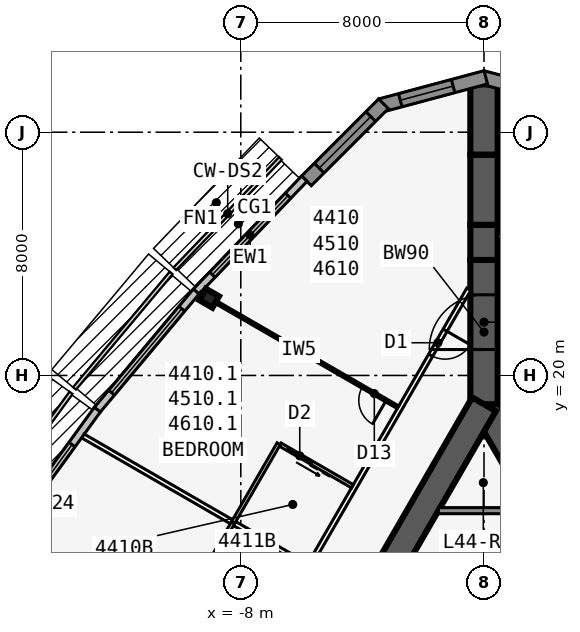
"""IFC4 building model, lengths in metres.
Left out: names, types, materials, properties, quantities, classifications, styles, units other than length and angle.
Written with IfcOpenShell. Run it as: python <this file> out.ifc"""

import sys

from ifc_helpers import new_model, si_unit, direction, frame, frame_2d, origin, origin_2d, place, context, subcontext, project, spatial, polyline, rectangle, i_section, outline, extrude, element, fill, save


model = new_model("IFC4")
c1 = context("Model", 3, precision=1e-05, world=origin(), true_north=direction((0.0, 1.0)))
c2 = subcontext(c1, "Body", "Model", "MODEL_VIEW")
j1 = project(units=[si_unit("LENGTHUNIT", "METRE"), si_unit("PLANEANGLEUNIT", "RADIAN")], contexts=[c1])
p1 = place(None, origin())
s1 = spatial("IfcSite", under=j1, at=p1, CompositionType="ELEMENT")
p2 = place(p1, origin())
s2 = spatial("IfcBuilding", under=s1, at=p2, CompositionType="ELEMENT")
p3 = place(p2, frame((0.0, 0.0, 165.7)))
s3 = spatial("IfcBuildingStorey", under=s2, at=p3, CompositionType="ELEMENT", Elevation=165.7)
p4 = place(p3, frame((16.5, -9.526, 0.0), z_axis=(0.0, 0.0, 1.0), x_axis=(-0.499999749417, 0.866025548458, 0.0)))
e1 = element("IfcWall", 1, at=p4, inside=s3, PredefinedType="SHEAR", context=c2, shape_type="SweptSolid", body=[
    extrude(rectangle(XDim=33.0, YDim=0.9, at=frame_2d((16.5, 0.0))), origin(), (0.0, 0.0, 1.0), 3.4),
])
p5 = place(p4, frame((14.15, 0.0, 0.0)))
e2 = element("IfcOpeningElement", 2, at=p5, cuts=e1, PredefinedType="OPENING", context=c2, shape_type="SweptSolid", body=[
    extrude(rectangle(XDim=1.8, YDim=2.13, at=frame_2d((0.9, 1.065))), frame((0.0, 0.46, 0.0), z_axis=(0.0, -1.0, 0.0), x_axis=(1.0, 0.0, 0.0)), (0.0, 0.0, 1.0), 0.92),
])
p6 = place(p4, frame((12.6, 0.0, 0.0)))
e3 = element("IfcOpeningElement", 3, at=p6, cuts=e1, PredefinedType="OPENING", context=c2, shape_type="SweptSolid", body=[
    extrude(rectangle(XDim=1.0, YDim=2.13, at=frame_2d((0.5, 1.065))), frame((0.0, 0.46, 0.0), z_axis=(0.0, -1.0, 0.0), x_axis=(1.0, 0.0, 0.0)), (0.0, 0.0, 1.0), 0.92),
])
p7 = place(p3, frame((0.0, 19.052, 0.0), z_axis=(0.0, 0.0, 1.0), x_axis=(-0.499999749417, -0.866025548458, 0.0)))
e4 = element("IfcWall", 4, at=p7, inside=s3, PredefinedType="SHEAR", context=c2, shape_type="SweptSolid", body=[
    extrude(rectangle(XDim=33.0, YDim=0.9, at=frame_2d((16.5, 0.0))), origin(), (0.0, 0.0, 1.0), 3.4),
])
p8 = place(p7, frame((14.15, 0.0, 0.0)))
e5 = element("IfcOpeningElement", 5, at=p8, cuts=e4, PredefinedType="OPENING", context=c2, shape_type="SweptSolid", body=[
    extrude(rectangle(XDim=1.8, YDim=2.13, at=frame_2d((0.9, 1.065))), frame((0.0, 0.46, 0.0), z_axis=(0.0, -1.0, 0.0), x_axis=(1.0, 0.0, 0.0)), (0.0, 0.0, 1.0), 0.92),
])
p9 = place(p7, frame((12.6, 0.0, 0.0)))
e6 = element("IfcOpeningElement", 6, at=p9, cuts=e4, PredefinedType="OPENING", context=c2, shape_type="SweptSolid", body=[
    extrude(rectangle(XDim=1.0, YDim=2.13, at=frame_2d((0.5, 1.065))), frame((0.0, 0.46, 0.0), z_axis=(0.0, -1.0, 0.0), x_axis=(1.0, 0.0, 0.0)), (0.0, 0.0, 1.0), 0.92),
])
p10 = place(p3, frame((0.0, 19.052, 0.0), z_axis=(0.0, 0.0, 1.0), x_axis=(0.0, 1.0, 0.0)))
e7 = element("IfcWall", 7, at=p10, inside=s3, PredefinedType="SHEAR", context=c2, shape_type="SweptSolid", body=[
    extrude(rectangle(XDim=4.746, YDim=0.9, at=frame_2d((2.373, 0.0))), origin(), (0.0, 0.0, 1.0), 3.4),
])
p11 = place(p10, frame((1.8, 0.0, 0.0)))
e8 = element("IfcOpeningElement", 8, at=p11, cuts=e7, PredefinedType="OPENING", context=c2, shape_type="SweptSolid", body=[
    extrude(rectangle(XDim=1.8, YDim=2.13, at=frame_2d((0.9, 1.065))), frame((0.0, 0.46, 0.0), z_axis=(0.0, -1.0, 0.0), x_axis=(1.0, 0.0, 0.0)), (0.0, 0.0, 1.0), 0.92),
])
p12 = place(p3, frame((0.0, 23.799, 0.0), z_axis=(0.0, 0.0, 1.0), x_axis=(0.0, 1.0, 0.0)))
e9 = element("IfcWall", 9, at=p12, inside=s3, PredefinedType="SHEAR", context=c2, shape_type="SweptSolid", body=[
    extrude(rectangle(XDim=1.155, YDim=0.9, at=frame_2d((0.577, 0.0))), origin(), (0.0, 0.0, 1.0), 3.4),
])
p13 = place(p3, frame((0.0, 24.953, 0.0), z_axis=(0.0, 0.0, 1.0), x_axis=(0.0, 1.0, 0.0)))
e10 = element("IfcWall", 10, at=p13, inside=s3, PredefinedType="SHEAR", context=c2, shape_type="SweptSolid", body=[
    extrude(rectangle(XDim=2.309, YDim=0.9, at=frame_2d((1.155, 0.0))), origin(), (0.0, 0.0, 1.0), 3.4),
])
p14 = place(p3, frame((0.0, 27.263, 0.0), z_axis=(0.0, 0.0, 1.0), x_axis=(0.0, 1.0, 0.0)))
e11 = element("IfcWall", 11, at=p14, inside=s3, PredefinedType="SHEAR", context=c2, shape_type="SweptSolid", body=[
    extrude(rectangle(XDim=2.31, YDim=0.9, at=frame_2d((1.155, 0.0))), origin(), (0.0, 0.0, 1.0), 3.4),
])
p15 = place(p3, frame((-9.041, 22.541, 0.0), z_axis=(0.0, 0.0, 1.0), x_axis=(-0.5, -0.866025403784, 0.0)))
e12 = element("IfcColumn", 12, at=p15, inside=s3, PredefinedType="COLUMN", context=c2, shape_type="SweptSolid", body=[
    extrude(i_section(OverallWidth=0.432, OverallDepth=0.498, WebThickness=0.056, FlangeThickness=0.089, at=origin_2d()), origin(), (0.0, 0.0, 1.0), 3.4),
])
p16 = place(p3, frame((3.406, 28.877, 0.0), z_axis=(0.0, 0.0, 1.0), x_axis=(-0.965924653531, 0.258823421857, 0.0)))
e13 = element("IfcWall", 13, at=p16, inside=s3, PredefinedType="SOLIDWALL", context=c2, shape_type="SweptSolid", body=[
    extrude(outline(polyline([(3.586, 0.225), (3.527, 0.225), (3.035, 0.093), (3.0, 0.225), (0.0, 0.225), (0.0, -0.225), (3.586, -0.225), (3.586, 0.225)])), origin(), (0.0, 0.0, 1.0), 3.235),
])
p17 = place(p16, frame((0.675, 0.0, 0.45)))
e14 = element("IfcOpeningElement", 14, at=p17, cuts=e13, PredefinedType="OPENING", context=c2, shape_type="SweptSolid", body=[
    extrude(rectangle(XDim=1.8, YDim=2.4, at=frame_2d((0.9, 1.2))), frame((0.0, 0.235, 0.0), z_axis=(0.0, -1.0, 0.0), x_axis=(1.0, 0.0, 0.0)), (0.0, 0.0, 1.0), 0.47),
])
p18 = place(p3, frame((0.058, 29.805, 0.0), z_axis=(0.0, 0.0, 1.0), x_axis=(-0.965924653531, -0.258823421857, 0.0)))
e15 = element("IfcWall", 15, at=p18, inside=s3, PredefinedType="SOLIDWALL", context=c2, shape_type="SweptSolid", body=[
    extrude(outline(polyline([(3.586, 0.225), (0.586, 0.225), (0.551, 0.093), (0.06, 0.225), (0.0, 0.225), (0.0, -0.225), (3.586, -0.225), (3.586, 0.225)])), origin(), (0.0, 0.0, 1.0), 3.235),
])
p19 = place(p18, frame((1.111, 0.0, 0.45)))
e16 = element("IfcOpeningElement", 16, at=p19, cuts=e15, PredefinedType="OPENING", context=c2, shape_type="SweptSolid", body=[
    extrude(rectangle(XDim=1.8, YDim=2.4, at=frame_2d((0.9, 1.2))), frame((0.0, 0.235, 0.0), z_axis=(0.0, -1.0, 0.0), x_axis=(1.0, 0.0, 0.0)), (0.0, 0.0, 1.0), 0.47),
])
p20 = place(p3, frame((-3.305, 28.935, 0.0), z_axis=(0.0, 0.0, 1.0), x_axis=(-0.707106781187, -0.707106781187, 0.0)))
e17 = element("IfcWall", 17, at=p20, inside=s3, PredefinedType="SOLIDWALL", context=c2, shape_type="SweptSolid", body=[
    extrude(rectangle(XDim=3.586, YDim=0.45, at=frame_2d((1.793, 0.0))), origin(), (0.0, 0.0, 1.0), 3.235),
])
p21 = place(p20, frame((0.593, 0.0, 0.45)))
e18 = element("IfcOpeningElement", 18, at=p21, cuts=e17, PredefinedType="OPENING", context=c2, shape_type="SweptSolid", body=[
    extrude(rectangle(XDim=2.4, YDim=2.4, at=frame_2d((1.2, 1.2))), frame((0.0, 0.235, 0.0), z_axis=(0.0, -1.0, 0.0), x_axis=(1.0, 0.0, 0.0)), (0.0, 0.0, 1.0), 0.47),
])
p22 = place(p3, frame((-5.91, 26.472, 0.0), z_axis=(0.0, 0.0, 1.0), x_axis=(-0.691719937936, -0.722165858693, 0.0)))
e19 = element("IfcWall", 19, at=p22, inside=s3, PredefinedType="STANDARD", context=c2, shape_type="SweptSolid", body=[
    extrude(rectangle(XDim=5.148, YDim=0.25, at=frame_2d((2.574, 0.0))), origin(), (0.0, 0.0, 1.0), 3.235),
])
p23 = place(p22, frame((0.774, 0.0, 0.45)))
e20 = element("IfcOpeningElement", 20, at=p23, cuts=e19, PredefinedType="OPENING", context=c2, shape_type="SweptSolid", body=[
    extrude(rectangle(XDim=3.6, YDim=2.4, at=frame_2d((1.8, 1.2))), frame((0.0, 0.135, 0.0), z_axis=(0.0, -1.0, 0.0), x_axis=(1.0, 0.0, 0.0)), (0.0, 0.0, 1.0), 0.27),
])
p24 = place(p3, frame((-9.465, 22.76, 0.0), z_axis=(0.0, 0.0, 1.0), x_axis=(-0.641810386606, -0.766863369607, 0.0)))
e21 = element("IfcWall", 21, at=p24, inside=s3, PredefinedType="STANDARD", context=c2, shape_type="SweptSolid", body=[
    extrude(rectangle(XDim=5.076, YDim=0.25, at=frame_2d((2.538, 0.0))), origin(), (0.0, 0.0, 1.0), 3.235),
])
p25 = place(p24, frame((0.738, 0.0, 0.45)))
e22 = element("IfcOpeningElement", 22, at=p25, cuts=e21, PredefinedType="OPENING", context=c2, shape_type="SweptSolid", body=[
    extrude(rectangle(XDim=3.6, YDim=2.4, at=frame_2d((1.8, 1.2))), frame((0.0, 0.135, 0.0), z_axis=(0.0, -1.0, 0.0), x_axis=(1.0, 0.0, 0.0)), (0.0, 0.0, 1.0), 0.27),
])
p26 = place(p3, frame((-12.718, 18.875, 0.0), z_axis=(0.0, 0.0, 1.0), x_axis=(-0.587669188412, -0.809101307001, 0.0)))
e23 = element("IfcWall", 23, at=p26, inside=s3, PredefinedType="STANDARD", context=c2, shape_type="SweptSolid", body=[
    extrude(rectangle(XDim=5.028, YDim=0.25, at=frame_2d((2.514, 0.0))), origin(), (0.0, 0.0, 1.0), 3.235),
])
p27 = place(p26, frame((1.418, 0.0, 0.45)))
e24 = element("IfcOpeningElement", 24, at=p27, cuts=e23, PredefinedType="OPENING", context=c2, shape_type="SweptSolid", body=[
    extrude(rectangle(XDim=3.0, YDim=2.4, at=frame_2d((1.5, 1.2))), frame((0.0, 0.135, 0.0), z_axis=(0.0, -1.0, 0.0), x_axis=(1.0, 0.0, 0.0)), (0.0, 0.0, 1.0), 0.27),
])
p28 = place(p3, frame((21.586, -11.885, 0.0), z_axis=(0.0, 0.0, 1.0), x_axis=(-0.500001915564, 0.86602429783, 0.0)))
e25 = element("IfcWall", 25, at=p28, inside=s3, PredefinedType="PARTITIONING", context=c2, shape_type="SweptSolid", body=[
    extrude(rectangle(XDim=42.172, YDim=0.15, at=frame_2d((21.086, 0.0))), origin(), (0.0, 0.0, 1.0), 3.235),
])
p29 = place(p28, frame((1.911, 0.0, 0.0)))
e26 = element("IfcOpeningElement", 26, at=p29, cuts=e25, PredefinedType="OPENING", context=c2, shape_type="SweptSolid", body=[
    extrude(rectangle(XDim=0.95, YDim=2.13, at=frame_2d((0.475, 1.065))), frame((0.0, 0.085, 0.0), z_axis=(0.0, -1.0, 0.0), x_axis=(1.0, 0.0, 0.0)), (0.0, 0.0, 1.0), 0.17),
])
p30 = place(p28, frame((9.311, 0.0, 0.0)))
e27 = element("IfcOpeningElement", 27, at=p30, cuts=e25, PredefinedType="OPENING", context=c2, shape_type="SweptSolid", body=[
    extrude(rectangle(XDim=0.95, YDim=2.13, at=frame_2d((0.475, 1.065))), frame((0.0, 0.085, 0.0), z_axis=(0.0, -1.0, 0.0), x_axis=(1.0, 0.0, 0.0)), (0.0, 0.0, 1.0), 0.17),
])
p31 = place(p28, frame((14.611, 0.0, 0.0)))
e28 = element("IfcOpeningElement", 28, at=p31, cuts=e25, PredefinedType="OPENING", context=c2, shape_type="SweptSolid", body=[
    extrude(rectangle(XDim=0.95, YDim=2.13, at=frame_2d((0.475, 1.065))), frame((0.0, 0.085, 0.0), z_axis=(0.0, -1.0, 0.0), x_axis=(1.0, 0.0, 0.0)), (0.0, 0.0, 1.0), 0.17),
])
p32 = place(p28, frame((26.711, 0.0, 0.0)))
e29 = element("IfcOpeningElement", 29, at=p32, cuts=e25, PredefinedType="OPENING", context=c2, shape_type="SweptSolid", body=[
    extrude(rectangle(XDim=0.95, YDim=2.13, at=frame_2d((0.475, 1.065))), frame((0.0, 0.085, 0.0), z_axis=(0.0, -1.0, 0.0), x_axis=(1.0, 0.0, 0.0)), (0.0, 0.0, 1.0), 0.17),
])
p33 = place(p28, frame((38.884, 0.0, 0.0)))
e30 = element("IfcOpeningElement", 30, at=p33, cuts=e25, PredefinedType="OPENING", context=c2, shape_type="SweptSolid", body=[
    extrude(rectangle(XDim=0.95, YDim=2.13, at=frame_2d((0.475, 1.065))), frame((0.0, 0.085, 0.0), z_axis=(0.0, -1.0, 0.0), x_axis=(1.0, 0.0, 0.0)), (0.0, 0.0, 1.0), 0.17),
])
p34 = place(p3, frame((-0.5, 22.836, 0.0), z_axis=(0.0, 0.0, 1.0), x_axis=(-0.500001677587, -0.866024435227, 0.0)))
e31 = element("IfcWall", 31, at=p34, inside=s3, PredefinedType="PARTITIONING", context=c2, shape_type="SweptSolid", body=[
    extrude(rectangle(XDim=39.054, YDim=0.15, at=frame_2d((19.527, 0.0))), origin(), (0.0, 0.0, 1.0), 3.235),
])
p35 = place(p34, frame((1.558, 0.0, 0.0)))
e32 = element("IfcOpeningElement", 32, at=p35, cuts=e31, PredefinedType="OPENING", context=c2, shape_type="SweptSolid", body=[
    extrude(rectangle(XDim=0.95, YDim=2.13, at=frame_2d((0.475, 1.065))), frame((0.0, 0.085, 0.0), z_axis=(0.0, -1.0, 0.0), x_axis=(1.0, 0.0, 0.0)), (0.0, 0.0, 1.0), 0.17),
])
p36 = place(p34, frame((19.052, 0.0, 0.0)))
e33 = element("IfcOpeningElement", 33, at=p36, cuts=e31, PredefinedType="OPENING", context=c2, shape_type="SweptSolid", body=[
    extrude(rectangle(XDim=0.95, YDim=2.13, at=frame_2d((0.475, 1.065))), frame((0.0, 0.085, 0.0), z_axis=(0.0, -1.0, 0.0), x_axis=(1.0, 0.0, 0.0)), (0.0, 0.0, 1.0), 0.17),
])
p37 = place(p34, frame((31.752, 0.0, 0.0)))
e34 = element("IfcOpeningElement", 34, at=p37, cuts=e31, PredefinedType="OPENING", context=c2, shape_type="SweptSolid", body=[
    extrude(rectangle(XDim=0.95, YDim=2.13, at=frame_2d((0.475, 1.065))), frame((0.0, 0.085, 0.0), z_axis=(0.0, -1.0, 0.0), x_axis=(1.0, 0.0, 0.0)), (0.0, 0.0, 1.0), 0.17),
])
p38 = place(p34, frame((37.752, 0.0, 0.0)))
e35 = element("IfcOpeningElement", 35, at=p38, cuts=e31, PredefinedType="OPENING", context=c2, shape_type="SweptSolid", body=[
    extrude(rectangle(XDim=0.95, YDim=2.13, at=frame_2d((0.475, 1.065))), frame((0.0, 0.085, 0.0), z_axis=(0.0, -1.0, 0.0), x_axis=(1.0, 0.0, 0.0)), (0.0, 0.0, 1.0), 0.17),
])
p39 = place(p3, frame((-2.829, 18.954, 0.0), z_axis=(0.0, 0.0, 1.0), x_axis=(-0.866015739374, 0.500016738876, 0.0)))
e36 = element("IfcWall", 36, at=p39, inside=s3, PredefinedType="PARTITIONING", context=c2, shape_type="SweptSolid", body=[
    extrude(rectangle(XDim=7.516, YDim=0.1, at=frame_2d((3.758, 0.0))), origin(), (0.0, 0.0, 1.0), 2.389),
])
p40 = place(p39, frame((0.45, 0.0, 0.0)))
e37 = element("IfcOpeningElement", 37, at=p40, cuts=e36, PredefinedType="OPENING", context=c2, shape_type="SweptSolid", body=[
    extrude(rectangle(XDim=0.9, YDim=2.13, at=frame_2d((0.45, 1.065))), frame((0.0, 0.06, 0.0), z_axis=(0.0, -1.0, 0.0), x_axis=(1.0, 0.0, 0.0)), (0.0, 0.0, 1.0), 0.12),
])
p41 = place(p3, frame((-5.829, 13.757, 0.0), z_axis=(0.0, 0.0, 1.0), x_axis=(-0.866011529155, 0.500024030793, 0.0)))
e38 = element("IfcWall", 38, at=p41, inside=s3, PredefinedType="PARTITIONING", context=c2, shape_type="SweptSolid", body=[
    extrude(rectangle(XDim=8.502, YDim=0.15, at=frame_2d((4.251, 0.0))), origin(), (0.0, 0.0, 1.0), 3.235),
])
p42 = place(p3, frame((-6.753, 17.755, 0.0), z_axis=(0.0, 0.0, 1.0), x_axis=(-0.50002537861, -0.866010750942, 0.0)))
e39 = element("IfcWall", 39, at=p42, inside=s3, PredefinedType="PLUMBINGWALL", context=c2, shape_type="SweptSolid", body=[
    extrude(rectangle(XDim=3.0, YDim=0.12, at=frame_2d((1.5, 0.0))), origin(), (0.0, 0.0, 1.0), 3.235),
])
p43 = place(p3, frame((-4.329, 16.355, 0.0), z_axis=(0.0, 0.0, 1.0), x_axis=(-0.866035715982, 0.499982138324, 0.0)))
e40 = element("IfcWall", 40, at=p43, inside=s3, PredefinedType="PLUMBINGWALL", context=c2, shape_type="SweptSolid", body=[
    extrude(rectangle(XDim=2.74, YDim=0.12, at=frame_2d((1.37, 0.0))), origin(), (0.0, 0.0, 1.0), 3.235),
])
p44 = place(p43, frame((1.55, 0.0, 0.0)))
e41 = element("IfcOpeningElement", 41, at=p44, cuts=e40, PredefinedType="OPENING", context=c2, shape_type="SweptSolid", body=[
    extrude(rectangle(XDim=0.9, YDim=2.13, at=frame_2d((0.45, 1.065))), frame((0.0, 0.07, 0.0), z_axis=(0.0, -1.0, 0.0), x_axis=(1.0, 0.0, 0.0)), (0.0, 0.0, 1.0), 0.14),
])
p45 = place(p3, frame((-8.253, 15.157, 0.0), z_axis=(0.0, 0.0, 1.0), x_axis=(-0.499990139034, -0.866031096941, 0.0)))
e42 = element("IfcWall", 42, at=p45, inside=s3, PredefinedType="PLUMBINGWALL", context=c2, shape_type="SweptSolid", body=[
    extrude(rectangle(XDim=3.0, YDim=0.12, at=frame_2d((1.5, 0.0))), origin(), (0.0, 0.0, 1.0), 3.235),
])
p46 = place(p3, frame((-1.501, 15.552, 0.0), z_axis=(0.0, 0.0, 1.0), x_axis=(1.0, 0.0, 0.0)))
e43 = element("IfcWall", 43, at=p46, inside=s3, PredefinedType="SOLIDWALL", context=c2, shape_type="SweptSolid", body=[
    extrude(rectangle(XDim=3.002, YDim=0.2, at=frame_2d((1.501, 0.0))), origin(), (0.0, 0.0, 1.0), 3.235),
])
p47 = place(p19, origin())
e44 = element("IfcWindow", 44, at=p47, inside=s3, PartitioningType="SINGLE_PANEL", PredefinedType="WINDOW", context=c2, shape_type="SweptSolid", body=[
    extrude(rectangle(XDim=1.8, YDim=2.4, at=frame_2d((0.9, 1.2))), frame((0.0, 0.03, 0.0), z_axis=(0.0, -1.0, 0.0), x_axis=(1.0, 0.0, 0.0)), (0.0, 0.0, 1.0), 0.06),
])
fill(e16, e44)
p48 = place(p21, origin())
e45 = element("IfcWindow", 45, at=p48, inside=s3, PartitioningType="SINGLE_PANEL", PredefinedType="WINDOW", context=c2, shape_type="SweptSolid", body=[
    extrude(rectangle(XDim=2.4, YDim=2.4, at=frame_2d((1.2, 1.2))), frame((0.0, 0.03, 0.0), z_axis=(0.0, -1.0, 0.0), x_axis=(1.0, 0.0, 0.0)), (0.0, 0.0, 1.0), 0.06),
])
fill(e18, e45)
p49 = place(p23, origin())
e46 = element("IfcWindow", 46, at=p49, inside=s3, PartitioningType="SINGLE_PANEL", PredefinedType="WINDOW", context=c2, shape_type="SweptSolid", body=[
    extrude(rectangle(XDim=3.6, YDim=2.4, at=frame_2d((1.8, 1.2))), frame((0.0, 0.03, 0.0), z_axis=(0.0, -1.0, 0.0), x_axis=(1.0, 0.0, 0.0)), (0.0, 0.0, 1.0), 0.06),
])
fill(e20, e46)
p50 = place(p25, origin())
e47 = element("IfcWindow", 47, at=p50, inside=s3, PartitioningType="SINGLE_PANEL", PredefinedType="WINDOW", context=c2, shape_type="SweptSolid", body=[
    extrude(rectangle(XDim=3.6, YDim=2.4, at=frame_2d((1.8, 1.2))), frame((0.0, 0.03, 0.0), z_axis=(0.0, -1.0, 0.0), x_axis=(1.0, 0.0, 0.0)), (0.0, 0.0, 1.0), 0.06),
])
fill(e22, e47)
p51 = place(p27, origin())
e48 = element("IfcWindow", 48, at=p51, inside=s3, PartitioningType="SINGLE_PANEL", PredefinedType="WINDOW", context=c2, shape_type="SweptSolid", body=[
    extrude(rectangle(XDim=3.0, YDim=2.4, at=frame_2d((1.5, 1.2))), frame((0.0, 0.03, 0.0), z_axis=(0.0, -1.0, 0.0), x_axis=(1.0, 0.0, 0.0)), (0.0, 0.0, 1.0), 0.06),
])
fill(e24, e48)
p52 = place(p40, origin())
e49 = element("IfcDoor", 49, at=p52, inside=s3, OperationType="SINGLE_SWING_LEFT", PredefinedType="DOOR", context=c2, shape_type="SweptSolid", body=[
    extrude(rectangle(XDim=0.9, YDim=2.13, at=frame_2d((0.45, 1.065))), frame((0.0, 0.025, 0.0), z_axis=(0.0, -1.0, 0.0), x_axis=(1.0, 0.0, 0.0)), (0.0, 0.0, 1.0), 0.05),
])
fill(e37, e49)
p53 = place(p35, origin())
e50 = element("IfcDoor", 50, at=p53, inside=s3, OperationType="SINGLE_SWING_LEFT", PredefinedType="DOOR", context=c2, shape_type="SweptSolid", body=[
    extrude(rectangle(XDim=0.95, YDim=2.13, at=frame_2d((0.475, 1.065))), frame((0.0, 0.025, 0.0), z_axis=(0.0, -1.0, 0.0), x_axis=(1.0, 0.0, 0.0)), (0.0, 0.0, 1.0), 0.05),
])
fill(e32, e50)
p54 = place(p44, origin())
e51 = element("IfcDoor", 51, at=p54, inside=s3, OperationType="SLIDING_TO_LEFT", PredefinedType="DOOR", context=c2, shape_type="SweptSolid", body=[
    extrude(rectangle(XDim=0.9, YDim=2.13, at=frame_2d((0.45, 1.065))), frame((0.0, 0.025, 0.0), z_axis=(0.0, -1.0, 0.0), x_axis=(1.0, 0.0, 0.0)), (0.0, 0.0, 1.0), 0.05),
])
fill(e41, e51)
p55 = place(p11, origin())
e52 = element("IfcDoor", 52, at=p55, inside=s3, OperationType="DOUBLE_DOOR_DOUBLE_SWING", PredefinedType="DOOR", context=c2, shape_type="SweptSolid", body=[
    extrude(rectangle(XDim=1.8, YDim=2.13, at=frame_2d((0.9, 1.065))), frame((0.0, 0.025, 0.0), z_axis=(0.0, -1.0, 0.0), x_axis=(1.0, 0.0, 0.0)), (0.0, 0.0, 1.0), 0.05),
])
fill(e8, e52)
save(model, sys.argv[1])
